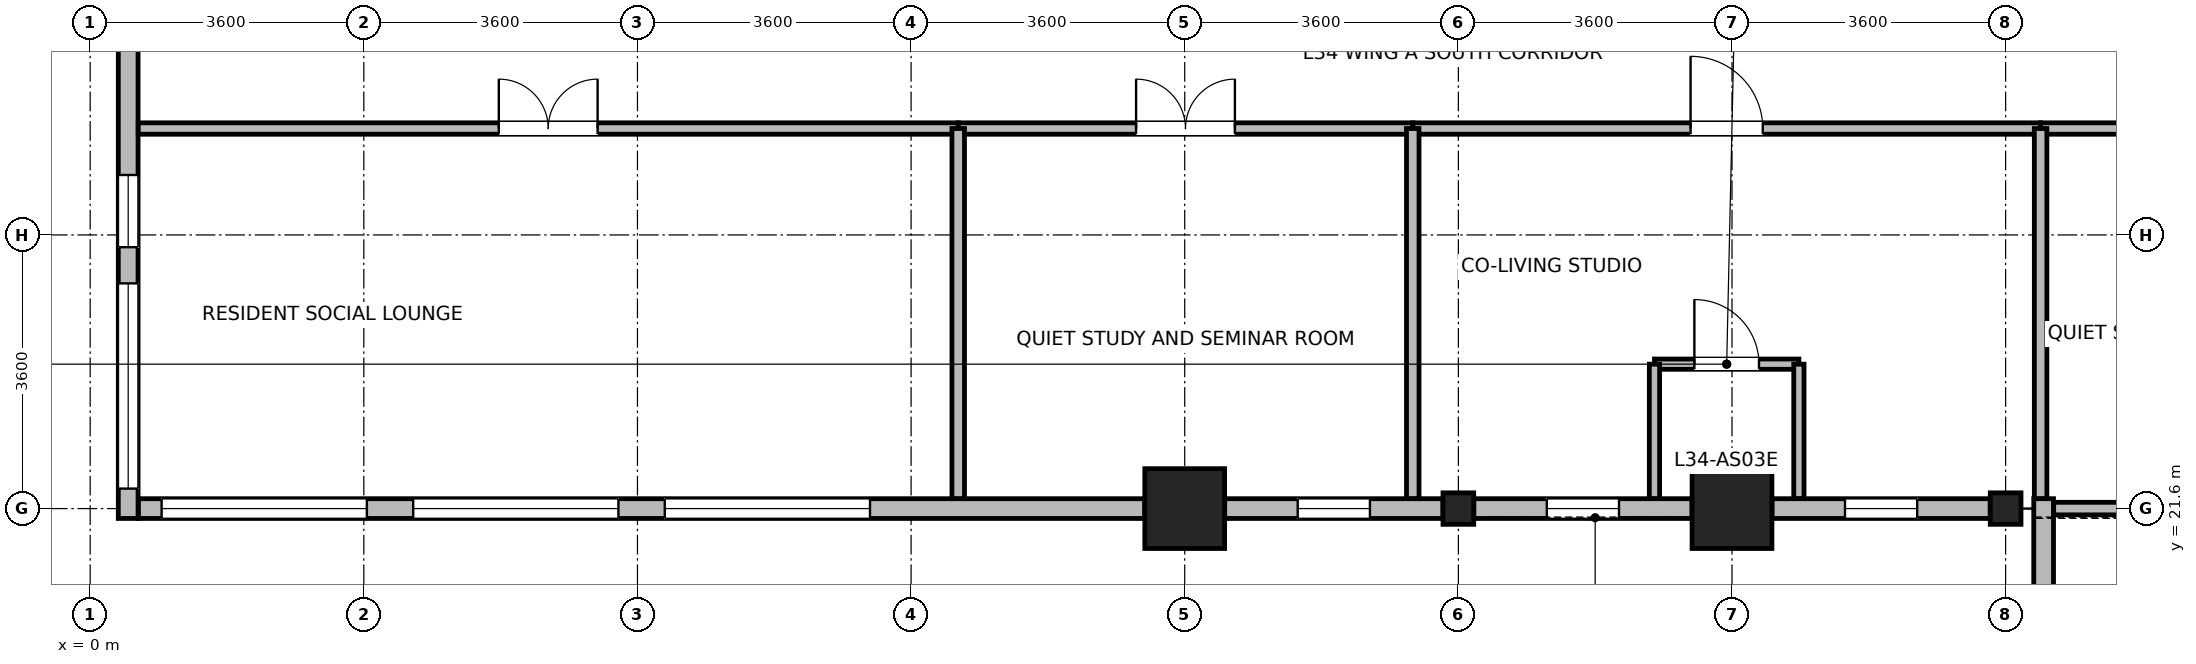
"""IFC4 building model, lengths in metres.
Left out: names, types, materials, properties, quantities, classifications, styles, units other than length and angle.
Written with IfcOpenShell. Run it as: python <this file> out.ifc"""

import sys

from ifc_helpers import new_model, si_unit, direction, frame, frame_2d, origin, origin_2d, place, context, subcontext, project, spatial, rectangle, i_section, extrude, source, transform, mapped, element, fill, save


model = new_model("IFC4")
c1 = context("Model", 3, precision=1e-05, world=origin(), true_north=direction((0.0, 1.0)))
c2 = subcontext(c1, "Body", "Model", "MODEL_VIEW")
j1 = project(units=[si_unit("LENGTHUNIT", "METRE"), si_unit("PLANEANGLEUNIT", "RADIAN")], contexts=[c1])
p1 = place(None, origin())
s1 = spatial("IfcSite", under=j1, at=p1, CompositionType="ELEMENT")
p2 = place(p1, origin())
s2 = spatial("IfcBuilding", under=s1, at=p2, CompositionType="ELEMENT")
p3 = place(p2, frame((0.0, 0.0, 135.6)))
s3 = spatial("IfcBuildingStorey", under=s2, at=p3, CompositionType="ELEMENT", Elevation=135.6)
m1 = source(origin(), c2, "Body", "SweptSolid", [
    extrude(rectangle(XDim=1.05, YDim=1.05, at=origin_2d()), origin(), (0.0, 0.0, 1.0), 4.6),
])
for number, where, z_axis, x_axis in (
    (1, (14.4, 21.6, 0.0), (0.0, 0.0, 1.0), (1.0, 0.0, 0.0)),
    (2, (21.6, 21.6, 0.0), (0.0, 0.0, 1.0), (1.0, 0.0, 0.0)),
):
    element("IfcColumn", number, at=place(p3, frame(where, z_axis=z_axis, x_axis=x_axis)), inside=s3, PredefinedType="COLUMN", context=c2, shape_type="MappedRepresentation", body=[
        mapped(m1, transform((0.0, 0.0, 0.0), x_axis=(1.0, 0.0, 0.0), y_axis=(0.0, 1.0, 0.0), z_axis=(0.0, 0.0, 1.0), scale=1.0)),
    ])
m2 = source(origin(), c2, "Body", "SweptSolid", [
    extrude(i_section(OverallWidth=0.404, OverallDepth=0.414, WebThickness=0.021, FlangeThickness=0.028, FilletRadius=0.015, at=origin_2d()), origin(), (0.0, 0.0, 1.0), 4.6),
])
for number, where, z_axis, x_axis in (
    (3, (18.0, 21.6, 0.0), (0.0, 0.0, 1.0), (1.0, 0.0, 0.0)),
    (4, (25.2, 21.6, 0.0), (0.0, 0.0, 1.0), (1.0, 0.0, 0.0)),
):
    element("IfcColumn", number, at=place(p3, frame(where, z_axis=z_axis, x_axis=x_axis)), inside=s3, PredefinedType="COLUMN", context=c2, shape_type="MappedRepresentation", body=[
        mapped(m2, transform((0.0, 0.0, 0.0), x_axis=(1.0, 0.0, 0.0), y_axis=(0.0, 1.0, 0.0), z_axis=(0.0, 0.0, 1.0), scale=1.0)),
    ])
p4 = place(p3, frame((0.5, 21.47, 0.0), z_axis=(0.0, 0.0, 1.0), x_axis=(0.0, 1.0, 0.0)))
e5 = element("IfcWall", 5, at=p4, inside=s3, PredefinedType="STANDARD", context=c2, shape_type="SweptSolid", body=[
    extrude(rectangle(XDim=6.972, YDim=0.26, at=frame_2d((3.486, 0.0))), origin(), (0.0, 0.0, 1.0), 4.34),
])
p5 = place(p4, frame((0.393, 0.0, 0.85)))
e6 = element("IfcOpeningElement", 6, at=p5, cuts=e5, PredefinedType="OPENING", context=c2, shape_type="SweptSolid", body=[
    extrude(rectangle(XDim=2.7, YDim=2.05, at=frame_2d((1.35, 1.025))), frame((0.0, 0.14, 0.0), z_axis=(0.0, -1.0, 0.0), x_axis=(1.0, 0.0, 0.0)), (0.0, 0.0, 1.0), 0.28),
])
p6 = place(p4, frame((3.569, 0.0, 0.85)))
e7 = element("IfcOpeningElement", 7, at=p6, cuts=e5, PredefinedType="OPENING", context=c2, shape_type="SweptSolid", body=[
    extrude(rectangle(XDim=0.95, YDim=1.75, at=frame_2d((0.475, 0.875))), frame((0.0, 0.14, 0.0), z_axis=(0.0, -1.0, 0.0), x_axis=(1.0, 0.0, 0.0)), (0.0, 0.0, 1.0), 0.28),
])
p7 = place(p3, frame((13.874, 21.6, 0.0), z_axis=(0.0, 0.0, 1.0), x_axis=(-1.0, 0.0, 0.0)))
e8 = element("IfcWall", 8, at=p7, inside=s3, PredefinedType="STANDARD", context=c2, shape_type="SweptSolid", body=[
    extrude(rectangle(XDim=13.239, YDim=0.26, at=frame_2d((6.62, 0.0))), origin(), (0.0, 0.0, 1.0), 4.34),
])
p8 = place(p7, frame((3.615, 0.0, 0.85)))
e9 = element("IfcOpeningElement", 9, at=p8, cuts=e8, PredefinedType="OPENING", context=c2, shape_type="SweptSolid", body=[
    extrude(rectangle(XDim=2.7, YDim=2.05, at=frame_2d((1.35, 1.025))), frame((0.0, 0.14, 0.0), z_axis=(0.0, -1.0, 0.0), x_axis=(1.0, 0.0, 0.0)), (0.0, 0.0, 1.0), 0.28),
])
p9 = place(p7, frame((6.924, 0.0, 0.85)))
e10 = element("IfcOpeningElement", 10, at=p9, cuts=e8, PredefinedType="OPENING", context=c2, shape_type="SweptSolid", body=[
    extrude(rectangle(XDim=2.7, YDim=2.05, at=frame_2d((1.35, 1.025))), frame((0.0, 0.14, 0.0), z_axis=(0.0, -1.0, 0.0), x_axis=(1.0, 0.0, 0.0)), (0.0, 0.0, 1.0), 0.28),
])
p10 = place(p7, frame((10.234, 0.0, 0.85)))
e11 = element("IfcOpeningElement", 11, at=p10, cuts=e8, PredefinedType="OPENING", context=c2, shape_type="SweptSolid", body=[
    extrude(rectangle(XDim=2.7, YDim=2.05, at=frame_2d((1.35, 1.025))), frame((0.0, 0.14, 0.0), z_axis=(0.0, -1.0, 0.0), x_axis=(1.0, 0.0, 0.0)), (0.0, 0.0, 1.0), 0.28),
])
p11 = place(p3, frame((17.797, 21.6, 0.0), z_axis=(0.0, 0.0, 1.0), x_axis=(-1.0, 0.0, 0.0)))
e12 = element("IfcWall", 12, at=p11, inside=s3, PredefinedType="STANDARD", context=c2, shape_type="SweptSolid", body=[
    extrude(rectangle(XDim=2.871, YDim=0.26, at=frame_2d((1.436, 0.0))), origin(), (0.0, 0.0, 1.0), 3.89),
])
p12 = place(p11, frame((0.96, 0.0, 0.85)))
e13 = element("IfcOpeningElement", 13, at=p12, cuts=e12, PredefinedType="OPENING", context=c2, shape_type="SweptSolid", body=[
    extrude(rectangle(XDim=0.95, YDim=1.75, at=frame_2d((0.475, 0.875))), frame((0.0, 0.14, 0.0), z_axis=(0.0, -1.0, 0.0), x_axis=(1.0, 0.0, 0.0)), (0.0, 0.0, 1.0), 0.28),
])
p13 = place(p3, frame((21.074, 21.6, 0.0), z_axis=(0.0, 0.0, 1.0), x_axis=(-1.0, 0.0, 0.0)))
e14 = element("IfcWall", 14, at=p13, inside=s3, PredefinedType="STANDARD", context=c2, shape_type="SweptSolid", body=[
    extrude(rectangle(XDim=2.871, YDim=0.26, at=frame_2d((1.436, 0.0))), origin(), (0.0, 0.0, 1.0), 3.89),
])
p14 = place(p13, frame((0.96, 0.0, 0.85)))
e15 = element("IfcOpeningElement", 15, at=p14, cuts=e14, PredefinedType="OPENING", context=c2, shape_type="SweptSolid", body=[
    extrude(rectangle(XDim=0.95, YDim=1.75, at=frame_2d((0.475, 0.875))), frame((0.0, 0.14, 0.0), z_axis=(0.0, -1.0, 0.0), x_axis=(1.0, 0.0, 0.0)), (0.0, 0.0, 1.0), 0.28),
])
p15 = place(p3, frame((24.997, 21.6, 0.0), z_axis=(0.0, 0.0, 1.0), x_axis=(-1.0, 0.0, 0.0)))
e16 = element("IfcWall", 16, at=p15, inside=s3, PredefinedType="STANDARD", context=c2, shape_type="SweptSolid", body=[
    extrude(rectangle(XDim=2.871, YDim=0.26, at=frame_2d((1.436, 0.0))), origin(), (0.0, 0.0, 1.0), 3.89),
])
p16 = place(p15, frame((0.96, 0.0, 0.85)))
e17 = element("IfcOpeningElement", 17, at=p16, cuts=e16, PredefinedType="OPENING", context=c2, shape_type="SweptSolid", body=[
    extrude(rectangle(XDim=0.95, YDim=1.75, at=frame_2d((0.475, 0.875))), frame((0.0, 0.14, 0.0), z_axis=(0.0, -1.0, 0.0), x_axis=(1.0, 0.0, 0.0)), (0.0, 0.0, 1.0), 0.28),
])
p17 = place(p3, frame((25.7, 1.67, 0.0), z_axis=(0.0, 0.0, 1.0), x_axis=(0.0, 1.0, 0.0)))
e18 = element("IfcWall", 18, at=p17, inside=s3, PredefinedType="STANDARD", context=c2, shape_type="SweptSolid", body=[
    extrude(rectangle(XDim=20.06, YDim=0.26, at=frame_2d((10.03, 0.0))), origin(), (0.0, 0.0, 1.0), 4.34),
])
p18 = place(p17, frame((7.008, 0.0, 0.85)))
e19 = element("IfcOpeningElement", 19, at=p18, cuts=e18, PredefinedType="OPENING", context=c2, shape_type="SweptSolid", body=[
    extrude(rectangle(XDim=2.7, YDim=2.05, at=frame_2d((1.35, 1.025))), frame((0.0, 0.14, 0.0), z_axis=(0.0, -1.0, 0.0), x_axis=(1.0, 0.0, 0.0)), (0.0, 0.0, 1.0), 0.28),
])
p19 = place(p17, frame((13.695, 0.0, 0.85)))
e20 = element("IfcOpeningElement", 20, at=p19, cuts=e18, PredefinedType="OPENING", context=c2, shape_type="SweptSolid", body=[
    extrude(rectangle(XDim=2.7, YDim=2.05, at=frame_2d((1.35, 1.025))), frame((0.0, 0.14, 0.0), z_axis=(0.0, -1.0, 0.0), x_axis=(1.0, 0.0, 0.0)), (0.0, 0.0, 1.0), 0.28),
])
p20 = place(p3, frame((20.58, 23.5, 0.0), z_axis=(0.0, 0.0, 1.0), x_axis=(1.0, 0.0, 0.0)))
e21 = element("IfcWall", 21, at=p20, inside=s3, PredefinedType="PARTITIONING", context=c2, shape_type="SweptSolid", body=[
    extrude(rectangle(XDim=1.9, YDim=0.135, at=frame_2d((0.95, 0.0))), origin(), (0.0, 0.0, 1.0), 4.34),
])
p21 = place(p20, frame((0.525, 0.0, 0.0)))
e22 = element("IfcOpeningElement", 22, at=p21, cuts=e21, PredefinedType="OPENING", context=c2, shape_type="SweptSolid", body=[
    extrude(rectangle(XDim=0.85, YDim=2.04, at=frame_2d((0.425, 1.02))), frame((0.0, 0.078, 0.0), z_axis=(0.0, -1.0, 0.0), x_axis=(1.0, 0.0, 0.0)), (0.0, 0.0, 1.0), 0.155),
])
for number, where, z_axis, x_axis in (
    (23, (20.58, 21.732, 0.0), (0.0, 0.0, 1.0), (0.0, 1.0, 0.0)),
    (24, (22.48, 21.732, 0.0), (0.0, 0.0, 1.0), (0.0, 1.0, 0.0)),
):
    element("IfcWall", number, at=place(p3, frame(where, z_axis=z_axis, x_axis=x_axis)), inside=s3, PredefinedType="PARTITIONING", context=c2, shape_type="SweptSolid", body=[
        extrude(rectangle(XDim=1.768, YDim=0.135, at=frame_2d((0.884, 0.0))), origin(), (0.0, 0.0, 1.0), 4.34),
    ])
p22 = place(p3, frame((0.632, 26.6, 0.0), z_axis=(0.0, 0.0, 1.0), x_axis=(1.0, 0.0, 0.0)))
e25 = element("IfcWall", 25, at=p22, inside=s3, PredefinedType="PARTITIONING", context=c2, shape_type="SweptSolid", body=[
    extrude(rectangle(XDim=10.788, YDim=0.15, at=frame_2d((5.394, 0.0))), origin(), (0.0, 0.0, 1.0), 4.34),
])
p23 = place(p22, frame((4.744, 0.0, 0.0)))
e26 = element("IfcOpeningElement", 26, at=p23, cuts=e25, PredefinedType="OPENING", context=c2, shape_type="SweptSolid", body=[
    extrude(rectangle(XDim=1.3, YDim=2.12, at=frame_2d((0.65, 1.06))), frame((0.0, 0.085, 0.0), z_axis=(0.0, -1.0, 0.0), x_axis=(1.0, 0.0, 0.0)), (0.0, 0.0, 1.0), 0.17),
])
p24 = place(p3, frame((17.4, 26.6, 0.0), z_axis=(0.0, 0.0, 1.0), x_axis=(1.0, 0.0, 0.0)))
e27 = element("IfcWall", 27, at=p24, inside=s3, PredefinedType="PARTITIONING", context=c2, shape_type="SweptSolid", body=[
    extrude(rectangle(XDim=8.26, YDim=0.15, at=frame_2d((4.13, 0.0))), origin(), (0.0, 0.0, 1.0), 4.34),
])
p25 = place(p24, frame((3.655, 0.0, 0.0)))
e28 = element("IfcOpeningElement", 28, at=p25, cuts=e27, PredefinedType="OPENING", context=c2, shape_type="SweptSolid", body=[
    extrude(rectangle(XDim=0.95, YDim=2.1, at=frame_2d((0.475, 1.05))), frame((0.0, 0.085, 0.0), z_axis=(0.0, -1.0, 0.0), x_axis=(1.0, 0.0, 0.0)), (0.0, 0.0, 1.0), 0.17),
])
p26 = place(p3, frame((25.66, 26.6, 0.0), z_axis=(0.0, 0.0, 1.0), x_axis=(1.0, 0.0, 0.0)))
e29 = element("IfcWall", 29, at=p26, inside=s3, PredefinedType="PARTITIONING", context=c2, shape_type="SweptSolid", body=[
    extrude(rectangle(XDim=7.7, YDim=0.15, at=frame_2d((3.85, 0.0))), origin(), (0.0, 0.0, 1.0), 4.34),
])
p27 = place(p26, frame((3.2, 0.0, 0.0)))
e30 = element("IfcOpeningElement", 30, at=p27, cuts=e29, PredefinedType="OPENING", context=c2, shape_type="SweptSolid", body=[
    extrude(rectangle(XDim=1.3, YDim=2.12, at=frame_2d((0.65, 1.06))), frame((0.0, 0.085, 0.0), z_axis=(0.0, -1.0, 0.0), x_axis=(1.0, 0.0, 0.0)), (0.0, 0.0, 1.0), 0.17),
])
p28 = place(p3, frame((11.42, 26.6, 0.0), z_axis=(0.0, 0.0, 1.0), x_axis=(1.0, 0.0, 0.0)))
e31 = element("IfcWall", 31, at=p28, inside=s3, PredefinedType="PARTITIONING", context=c2, shape_type="SweptSolid", body=[
    extrude(rectangle(XDim=5.98, YDim=0.15, at=frame_2d((2.99, 0.0))), origin(), (0.0, 0.0, 1.0), 4.34),
])
p29 = place(p28, frame((2.34, 0.0, 0.0)))
e32 = element("IfcOpeningElement", 32, at=p29, cuts=e31, PredefinedType="OPENING", context=c2, shape_type="SweptSolid", body=[
    extrude(rectangle(XDim=1.3, YDim=2.12, at=frame_2d((0.65, 1.06))), frame((0.0, 0.085, 0.0), z_axis=(0.0, -1.0, 0.0), x_axis=(1.0, 0.0, 0.0)), (0.0, 0.0, 1.0), 0.17),
])
p30 = place(p3, frame((25.832, 21.6, 0.0), z_axis=(0.0, 0.0, 1.0), x_axis=(1.0, 0.0, 0.0)))
e33 = element("IfcWall", 33, at=p30, inside=s3, PredefinedType="PARTITIONING", context=c2, shape_type="SweptSolid", body=[
    extrude(rectangle(XDim=7.528, YDim=0.165, at=frame_2d((3.764, 0.0))), origin(), (0.0, 0.0, 1.0), 3.89),
])
for number, where, z_axis, x_axis in (
    (34, (11.42, 21.732, 0.0), (0.0, 0.0, 1.0), (0.0, 1.0, 0.0)),
    (35, (17.4, 21.732, 0.0), (0.0, 0.0, 1.0), (0.0, 1.0, 0.0)),
    (36, (25.66, 21.732, 0.0), (0.0, 0.0, 1.0), (0.0, 1.0, 0.0)),
):
    element("IfcWall", number, at=place(p3, frame(where, z_axis=z_axis, x_axis=x_axis)), inside=s3, PredefinedType="PARTITIONING", context=c2, shape_type="SweptSolid", body=[
        extrude(rectangle(XDim=4.868, YDim=0.165, at=frame_2d((2.434, 0.0))), origin(), (0.0, 0.0, 1.0), 4.34),
    ])
p31 = place(p5, origin())
e37 = element("IfcWindow", 37, at=p31, inside=s3, PartitioningType="SINGLE_PANEL", PredefinedType="WINDOW", context=c2, shape_type="SweptSolid", body=[
    extrude(rectangle(XDim=2.7, YDim=2.05, at=frame_2d((1.35, 1.025))), frame((0.0, 0.03, 0.0), z_axis=(0.0, -1.0, 0.0), x_axis=(1.0, 0.0, 0.0)), (0.0, 0.0, 1.0), 0.06),
])
fill(e6, e37)
p32 = place(p6, origin())
e38 = element("IfcWindow", 38, at=p32, inside=s3, PartitioningType="SINGLE_PANEL", PredefinedType="WINDOW", context=c2, shape_type="SweptSolid", body=[
    extrude(rectangle(XDim=0.95, YDim=1.75, at=frame_2d((0.475, 0.875))), frame((0.0, 0.03, 0.0), z_axis=(0.0, -1.0, 0.0), x_axis=(1.0, 0.0, 0.0)), (0.0, 0.0, 1.0), 0.06),
])
fill(e7, e38)
p33 = place(p8, origin())
e39 = element("IfcWindow", 39, at=p33, inside=s3, PartitioningType="SINGLE_PANEL", PredefinedType="WINDOW", context=c2, shape_type="SweptSolid", body=[
    extrude(rectangle(XDim=2.7, YDim=2.05, at=frame_2d((1.35, 1.025))), frame((0.0, 0.03, 0.0), z_axis=(0.0, -1.0, 0.0), x_axis=(1.0, 0.0, 0.0)), (0.0, 0.0, 1.0), 0.06),
])
fill(e9, e39)
p34 = place(p9, origin())
e40 = element("IfcWindow", 40, at=p34, inside=s3, PartitioningType="SINGLE_PANEL", PredefinedType="WINDOW", context=c2, shape_type="SweptSolid", body=[
    extrude(rectangle(XDim=2.7, YDim=2.05, at=frame_2d((1.35, 1.025))), frame((0.0, 0.03, 0.0), z_axis=(0.0, -1.0, 0.0), x_axis=(1.0, 0.0, 0.0)), (0.0, 0.0, 1.0), 0.06),
])
fill(e10, e40)
p35 = place(p10, origin())
e41 = element("IfcWindow", 41, at=p35, inside=s3, PartitioningType="SINGLE_PANEL", PredefinedType="WINDOW", context=c2, shape_type="SweptSolid", body=[
    extrude(rectangle(XDim=2.7, YDim=2.05, at=frame_2d((1.35, 1.025))), frame((0.0, 0.03, 0.0), z_axis=(0.0, -1.0, 0.0), x_axis=(1.0, 0.0, 0.0)), (0.0, 0.0, 1.0), 0.06),
])
fill(e11, e41)
p36 = place(p12, origin())
e42 = element("IfcWindow", 42, at=p36, inside=s3, PartitioningType="SINGLE_PANEL", PredefinedType="WINDOW", context=c2, shape_type="SweptSolid", body=[
    extrude(rectangle(XDim=0.95, YDim=1.75, at=frame_2d((0.475, 0.875))), frame((0.0, 0.03, 0.0), z_axis=(0.0, -1.0, 0.0), x_axis=(1.0, 0.0, 0.0)), (0.0, 0.0, 1.0), 0.06),
])
fill(e13, e42)
p37 = place(p14, origin())
e43 = element("IfcWindow", 43, at=p37, inside=s3, PartitioningType="SINGLE_PANEL", PredefinedType="WINDOW", context=c2, shape_type="SweptSolid", body=[
    extrude(rectangle(XDim=0.95, YDim=1.75, at=frame_2d((0.475, 0.875))), frame((0.0, 0.03, 0.0), z_axis=(0.0, -1.0, 0.0), x_axis=(1.0, 0.0, 0.0)), (0.0, 0.0, 1.0), 0.06),
])
fill(e15, e43)
p38 = place(p16, origin())
e44 = element("IfcWindow", 44, at=p38, inside=s3, PartitioningType="SINGLE_PANEL", PredefinedType="WINDOW", context=c2, shape_type="SweptSolid", body=[
    extrude(rectangle(XDim=0.95, YDim=1.75, at=frame_2d((0.475, 0.875))), frame((0.0, 0.03, 0.0), z_axis=(0.0, -1.0, 0.0), x_axis=(1.0, 0.0, 0.0)), (0.0, 0.0, 1.0), 0.06),
])
fill(e17, e44)
p39 = place(p21, origin())
e45 = element("IfcDoor", 45, at=p39, inside=s3, OperationType="SINGLE_SWING_LEFT", PredefinedType="DOOR", context=c2, shape_type="SweptSolid", body=[
    extrude(rectangle(XDim=0.85, YDim=2.04, at=frame_2d((0.425, 1.02))), frame((0.0, 0.025, 0.0), z_axis=(0.0, -1.0, 0.0), x_axis=(1.0, 0.0, 0.0)), (0.0, 0.0, 1.0), 0.05),
])
fill(e22, e45)
p40 = place(p23, origin())
e46 = element("IfcDoor", 46, at=p40, inside=s3, OperationType="DOUBLE_DOOR_SINGLE_SWING", PredefinedType="DOOR", context=c2, shape_type="SweptSolid", body=[
    extrude(rectangle(XDim=1.3, YDim=2.12, at=frame_2d((0.65, 1.06))), frame((0.0, 0.025, 0.0), z_axis=(0.0, -1.0, 0.0), x_axis=(1.0, 0.0, 0.0)), (0.0, 0.0, 1.0), 0.05),
])
fill(e26, e46)
p41 = place(p25, origin())
e47 = element("IfcDoor", 47, at=p41, inside=s3, OperationType="SINGLE_SWING_LEFT", PredefinedType="DOOR", context=c2, shape_type="SweptSolid", body=[
    extrude(rectangle(XDim=0.95, YDim=2.1, at=frame_2d((0.475, 1.05))), frame((0.0, 0.025, 0.0), z_axis=(0.0, -1.0, 0.0), x_axis=(1.0, 0.0, 0.0)), (0.0, 0.0, 1.0), 0.05),
])
fill(e28, e47)
p42 = place(p29, origin())
e48 = element("IfcDoor", 48, at=p42, inside=s3, OperationType="DOUBLE_DOOR_SINGLE_SWING", PredefinedType="DOOR", context=c2, shape_type="SweptSolid", body=[
    extrude(rectangle(XDim=1.3, YDim=2.12, at=frame_2d((0.65, 1.06))), frame((0.0, 0.025, 0.0), z_axis=(0.0, -1.0, 0.0), x_axis=(1.0, 0.0, 0.0)), (0.0, 0.0, 1.0), 0.05),
])
fill(e32, e48)
save(model, sys.argv[1])
